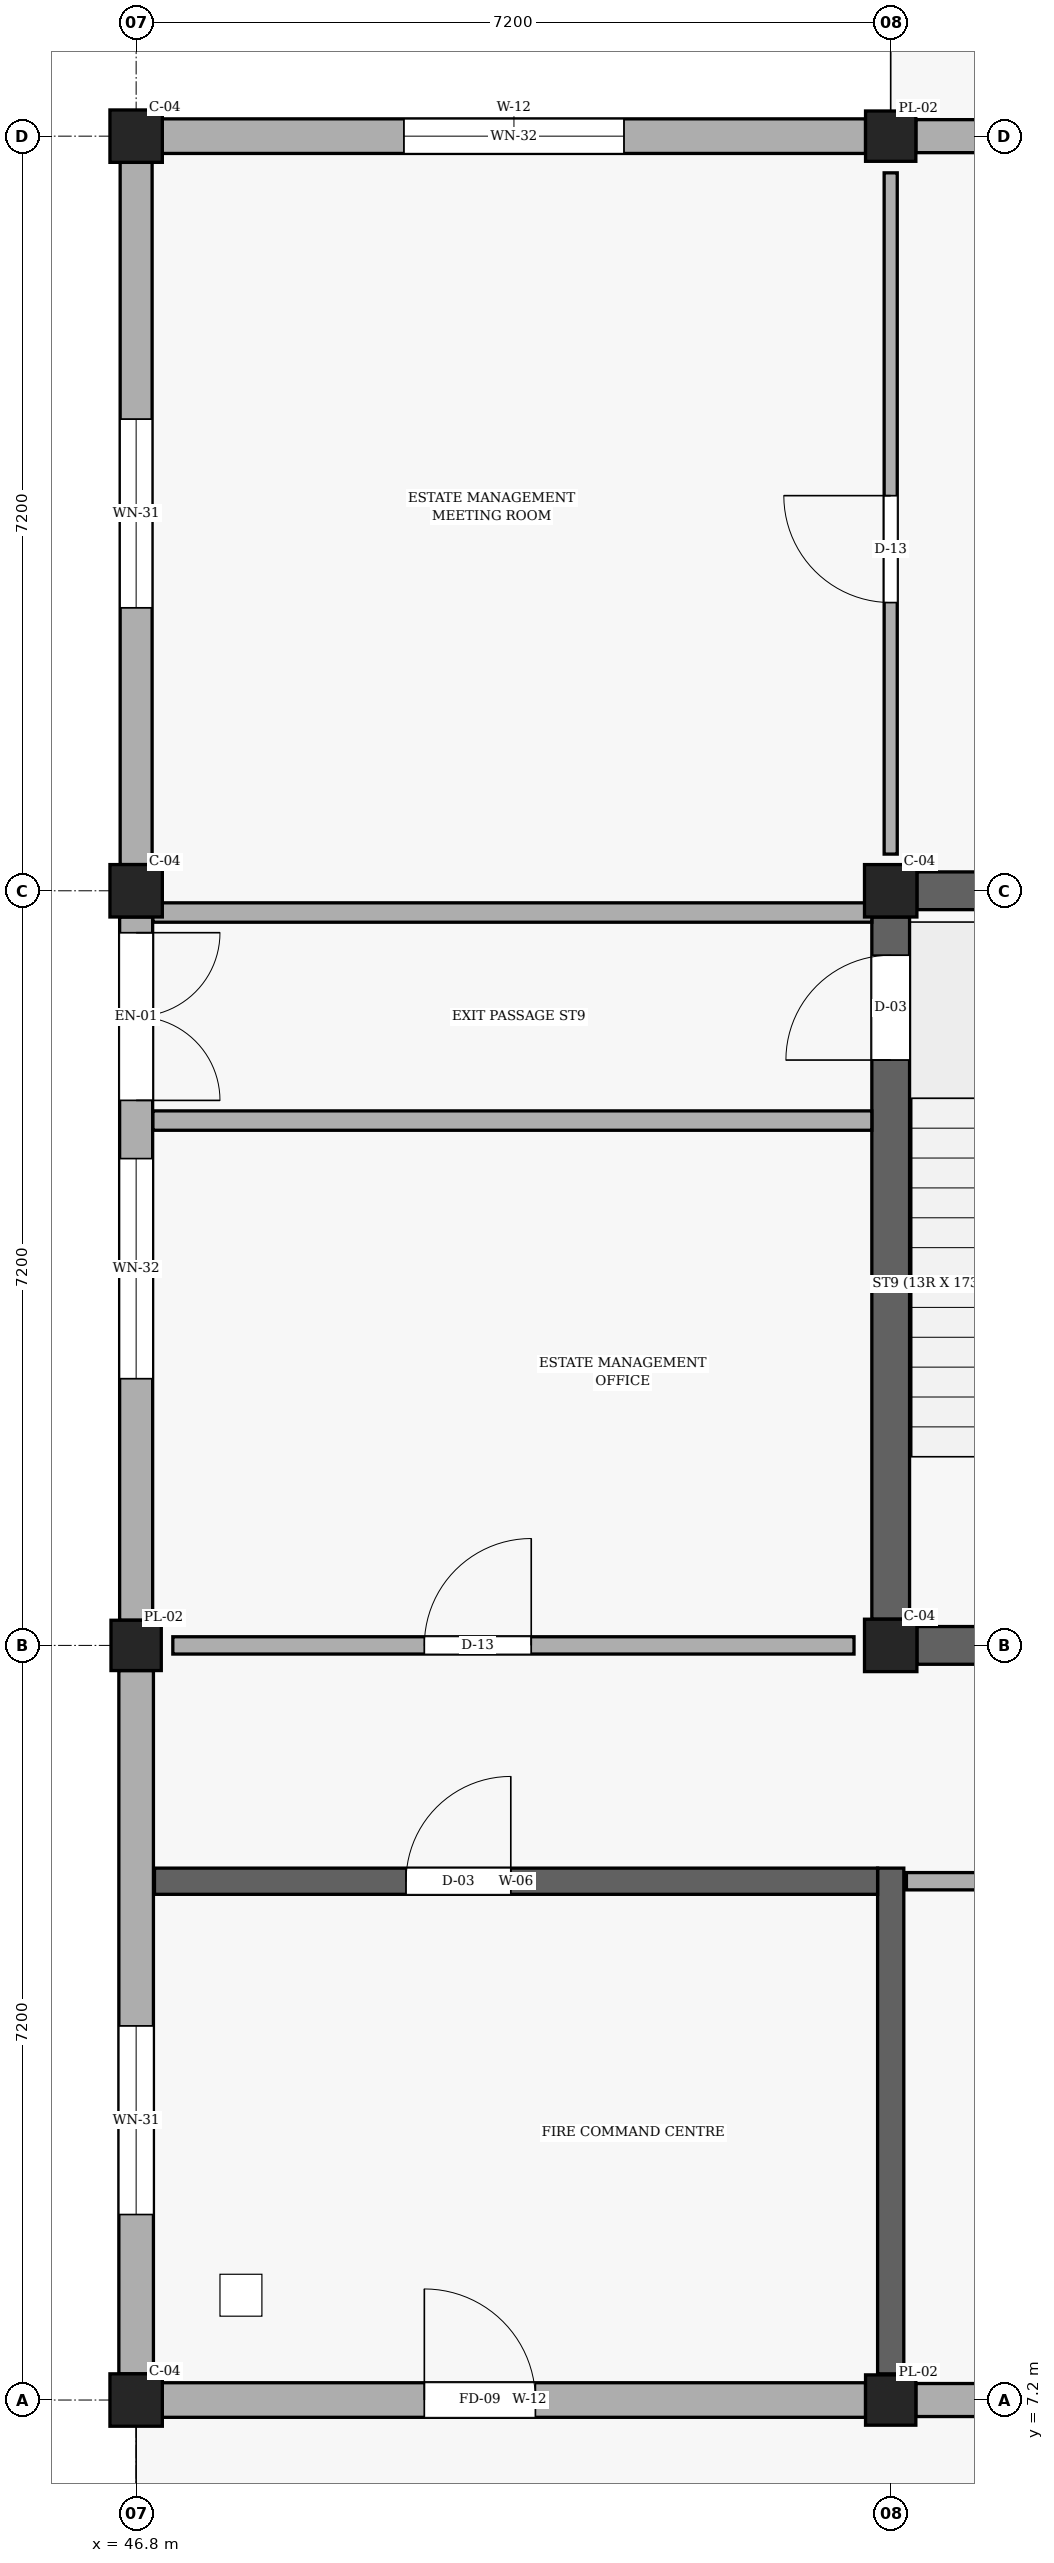
"""IFC4 building model, lengths in metres.
Left out: names, types, materials, properties, quantities, classifications, styles, units other than length and angle.
Written with IfcOpenShell. Run it as: python <this file> out.ifc"""

import sys

from ifc_helpers import new_model, si_unit, direction, frame, frame_2d, origin, origin_2d, place, context, subcontext, project, spatial, rectangle, extrude, element, fill, save


model = new_model("IFC4")
c1 = context("Model", 3, precision=1e-05, world=origin(), true_north=direction((0.0, 1.0)))
c2 = subcontext(c1, "Body", "Model", "MODEL_VIEW")
j1 = project(units=[si_unit("LENGTHUNIT", "METRE"), si_unit("PLANEANGLEUNIT", "RADIAN")], contexts=[c1])
p1 = place(None, origin())
s1 = spatial("IfcSite", under=j1, at=p1, CompositionType="ELEMENT")
p2 = place(p1, origin())
s2 = spatial("IfcBuilding", under=s1, at=p2, CompositionType="ELEMENT")
p3 = place(p2, origin())
s3 = spatial("IfcBuildingStorey", under=s2, at=p3, CompositionType="ELEMENT", Elevation=0.0)
p4 = place(p3, frame((46.8, 7.2, 0.0), z_axis=(0.0, 0.0, 1.0), x_axis=(1.0, 0.0, 0.0)))
e1 = element("IfcColumn", 1, at=p4, inside=s3, PredefinedType="COLUMN", context=c2, shape_type="SweptSolid", body=[
    extrude(rectangle(XDim=0.5, YDim=0.5, at=origin_2d()), origin(), (0.0, 0.0, 1.0), 4.5),
])
p5 = place(p3, frame((46.8, 14.4, 0.0), z_axis=(0.0, 0.0, 1.0), x_axis=(1.0, 0.0, 0.0)))
e2 = element("IfcColumn", 2, at=p5, inside=s3, PredefinedType="PILASTER", context=c2, shape_type="SweptSolid", body=[
    extrude(rectangle(XDim=0.48, YDim=0.48, at=origin_2d()), origin(), (0.0, 0.0, 1.0), 4.5),
])
for number, where, z_axis, x_axis in (
    (3, (46.8, 21.6, 0.0), (0.0, 0.0, 1.0), (1.0, 0.0, 0.0)),
    (4, (46.8, 28.8, 0.0), (0.0, 0.0, 1.0), (1.0, 0.0, 0.0)),
):
    element("IfcColumn", number, at=place(p3, frame(where, z_axis=z_axis, x_axis=x_axis)), inside=s3, PredefinedType="COLUMN", context=c2, shape_type="SweptSolid", body=[
        extrude(rectangle(XDim=0.5, YDim=0.5, at=origin_2d()), origin(), (0.0, 0.0, 1.0), 4.5),
    ])
p6 = place(p3, frame((54.0, 7.2, 0.0), z_axis=(0.0, 0.0, 1.0), x_axis=(1.0, 0.0, 0.0)))
e5 = element("IfcColumn", 5, at=p6, inside=s3, PredefinedType="PILASTER", context=c2, shape_type="SweptSolid", body=[
    extrude(rectangle(XDim=0.48, YDim=0.48, at=origin_2d()), origin(), (0.0, 0.0, 1.0), 4.5),
])
for number, where, z_axis, x_axis in (
    (6, (54.0, 14.4, 0.0), (0.0, 0.0, 1.0), (1.0, 0.0, 0.0)),
    (7, (54.0, 21.6, 0.0), (0.0, 0.0, 1.0), (1.0, 0.0, 0.0)),
):
    element("IfcColumn", number, at=place(p3, frame(where, z_axis=z_axis, x_axis=x_axis)), inside=s3, PredefinedType="COLUMN", context=c2, shape_type="SweptSolid", body=[
        extrude(rectangle(XDim=0.5, YDim=0.5, at=origin_2d()), origin(), (0.0, 0.0, 1.0), 4.5),
    ])
p7 = place(p3, frame((54.0, 28.8, 0.0), z_axis=(0.0, 0.0, 1.0), x_axis=(1.0, 0.0, 0.0)))
e8 = element("IfcColumn", 8, at=p7, inside=s3, PredefinedType="PILASTER", context=c2, shape_type="SweptSolid", body=[
    extrude(rectangle(XDim=0.48, YDim=0.48, at=origin_2d()), origin(), (0.0, 0.0, 1.0), 4.5),
])
p8 = place(p3, frame((47.05, 7.2, 0.0), z_axis=(0.0, 0.0, 1.0), x_axis=(1.0, 0.0, 0.0)))
e9 = element("IfcWall", 9, at=p8, inside=s3, PredefinedType="SOLIDWALL", context=c2, shape_type="SweptSolid", body=[
    extrude(rectangle(XDim=6.71, YDim=0.33, at=frame_2d((3.355, 0.0))), origin(), (0.0, 0.0, 1.0), 3.83),
])
p9 = place(p8, frame((2.5, 0.0, 0.0)))
e10 = element("IfcOpeningElement", 10, at=p9, cuts=e9, PredefinedType="OPENING", context=c2, shape_type="SweptSolid", body=[
    extrude(rectangle(XDim=1.06, YDim=2.15, at=frame_2d((0.53, 1.075))), frame((0.0, 0.175, 0.0), z_axis=(0.0, -1.0, 0.0), x_axis=(1.0, 0.0, 0.0)), (0.0, 0.0, 1.0), 0.35),
])
p10 = place(p3, frame((54.24, 7.2, 0.0), z_axis=(0.0, 0.0, 1.0), x_axis=(1.0, 0.0, 0.0)))
e11 = element("IfcWall", 11, at=p10, inside=s3, PredefinedType="SOLIDWALL", context=c2, shape_type="SweptSolid", body=[
    extrude(rectangle(XDim=6.71, YDim=0.315, at=frame_2d((3.355, 0.0))), origin(), (0.0, 0.0, 1.0), 3.83),
])
p11 = place(p10, frame((2.405, 0.0, 0.0)))
e12 = element("IfcOpeningElement", 12, at=p11, cuts=e11, PredefinedType="OPENING", context=c2, shape_type="SweptSolid", body=[
    extrude(rectangle(XDim=1.9, YDim=2.2, at=frame_2d((0.95, 1.1))), frame((0.0, 0.167, 0.0), z_axis=(0.0, -1.0, 0.0), x_axis=(1.0, 0.0, 0.0)), (0.0, 0.0, 1.0), 0.335),
])
p12 = place(p3, frame((60.95, 28.8, 0.0), z_axis=(0.0, 0.0, 1.0), x_axis=(-1.0, 0.0, 0.0)))
e13 = element("IfcWall", 13, at=p12, inside=s3, PredefinedType="SOLIDWALL", context=c2, shape_type="SweptSolid", body=[
    extrude(rectangle(XDim=6.71, YDim=0.315, at=frame_2d((3.355, 0.0))), origin(), (0.0, 0.0, 1.0), 3.83),
])
p13 = place(p12, frame((2.555, 0.0, 0.0)))
e14 = element("IfcOpeningElement", 14, at=p13, cuts=e13, PredefinedType="OPENING", context=c2, shape_type="SweptSolid", body=[
    extrude(rectangle(XDim=1.6, YDim=2.25, at=frame_2d((0.8, 1.125))), frame((0.0, 0.167, 0.0), z_axis=(0.0, -1.0, 0.0), x_axis=(1.0, 0.0, 0.0)), (0.0, 0.0, 1.0), 0.335),
])
p14 = place(p3, frame((53.76, 28.8, 0.0), z_axis=(0.0, 0.0, 1.0), x_axis=(-1.0, 0.0, 0.0)))
e15 = element("IfcWall", 15, at=p14, inside=s3, PredefinedType="SOLIDWALL", context=c2, shape_type="SweptSolid", body=[
    extrude(rectangle(XDim=6.71, YDim=0.33, at=frame_2d((3.355, 0.0))), origin(), (0.0, 0.0, 1.0), 3.83),
])
p15 = place(p14, frame((2.305, 0.0, 0.85)))
e16 = element("IfcOpeningElement", 16, at=p15, cuts=e15, PredefinedType="OPENING", context=c2, shape_type="SweptSolid", body=[
    extrude(rectangle(XDim=2.1, YDim=2.1, at=frame_2d((1.05, 1.05))), frame((0.0, 0.175, 0.0), z_axis=(0.0, -1.0, 0.0), x_axis=(1.0, 0.0, 0.0)), (0.0, 0.0, 1.0), 0.35),
])
p16 = place(p3, frame((46.8, 28.55, 0.0), z_axis=(0.0, 0.0, 1.0), x_axis=(0.0, -1.0, 0.0)))
e17 = element("IfcWall", 17, at=p16, inside=s3, PredefinedType="SOLIDWALL", context=c2, shape_type="SweptSolid", body=[
    extrude(rectangle(XDim=6.7, YDim=0.305, at=frame_2d((3.35, 0.0))), origin(), (0.0, 0.0, 1.0), 3.83),
])
p17 = place(p16, frame((2.45, 0.0, 0.85)))
e18 = element("IfcOpeningElement", 18, at=p17, cuts=e17, PredefinedType="OPENING", context=c2, shape_type="SweptSolid", body=[
    extrude(rectangle(XDim=1.8, YDim=2.1, at=frame_2d((0.9, 1.05))), frame((0.0, 0.163, 0.0), z_axis=(0.0, -1.0, 0.0), x_axis=(1.0, 0.0, 0.0)), (0.0, 0.0, 1.0), 0.325),
])
p18 = place(p3, frame((46.8, 21.35, 0.0), z_axis=(0.0, 0.0, 1.0), x_axis=(0.0, -1.0, 0.0)))
e19 = element("IfcWall", 19, at=p18, inside=s3, PredefinedType="SOLIDWALL", context=c2, shape_type="SweptSolid", body=[
    extrude(rectangle(XDim=6.71, YDim=0.315, at=frame_2d((3.355, 0.0))), origin(), (0.0, 0.0, 1.0), 3.83),
])
p19 = place(p18, frame((2.305, 0.0, 0.85)))
e20 = element("IfcOpeningElement", 20, at=p19, cuts=e19, PredefinedType="OPENING", context=c2, shape_type="SweptSolid", body=[
    extrude(rectangle(XDim=2.1, YDim=2.1, at=frame_2d((1.05, 1.05))), frame((0.0, 0.167, 0.0), z_axis=(0.0, -1.0, 0.0), x_axis=(1.0, 0.0, 0.0)), (0.0, 0.0, 1.0), 0.335),
])
p20 = place(p18, frame((0.15, 0.0, 0.0)))
e21 = element("IfcOpeningElement", 21, at=p20, cuts=e19, PredefinedType="OPENING", context=c2, shape_type="SweptSolid", body=[
    extrude(rectangle(XDim=1.6, YDim=2.25, at=frame_2d((0.8, 1.125))), frame((0.0, 0.167, 0.0), z_axis=(0.0, -1.0, 0.0), x_axis=(1.0, 0.0, 0.0)), (0.0, 0.0, 1.0), 0.335),
])
p21 = place(p3, frame((46.8, 14.16, 0.0), z_axis=(0.0, 0.0, 1.0), x_axis=(0.0, -1.0, 0.0)))
e22 = element("IfcWall", 22, at=p21, inside=s3, PredefinedType="SOLIDWALL", context=c2, shape_type="SweptSolid", body=[
    extrude(rectangle(XDim=6.71, YDim=0.33, at=frame_2d((3.355, 0.0))), origin(), (0.0, 0.0, 1.0), 3.83),
])
p22 = place(p21, frame((3.39, 0.0, 0.85)))
e23 = element("IfcOpeningElement", 23, at=p22, cuts=e22, PredefinedType="OPENING", context=c2, shape_type="SweptSolid", body=[
    extrude(rectangle(XDim=1.8, YDim=2.1, at=frame_2d((0.9, 1.05))), frame((0.0, 0.175, 0.0), z_axis=(0.0, -1.0, 0.0), x_axis=(1.0, 0.0, 0.0)), (0.0, 0.0, 1.0), 0.35),
])
p23 = place(p3, frame((54.0, 14.65, 0.0), z_axis=(0.0, 0.0, 1.0), x_axis=(0.0, 1.0, 0.0)))
e24 = element("IfcWall", 24, at=p23, inside=s3, PredefinedType="SHEAR", context=c2, shape_type="SweptSolid", body=[
    extrude(rectangle(XDim=6.7, YDim=0.36, at=frame_2d((3.35, 0.0))), origin(), (0.0, 0.0, 1.0), 4.26),
])
p24 = place(p23, frame((5.335, 0.0, 0.0)))
e25 = element("IfcOpeningElement", 25, at=p24, cuts=e24, PredefinedType="OPENING", context=c2, shape_type="SweptSolid", body=[
    extrude(rectangle(XDim=1.0, YDim=2.15, at=frame_2d((0.5, 1.075))), frame((0.0, 0.19, 0.0), z_axis=(0.0, -1.0, 0.0), x_axis=(1.0, 0.0, 0.0)), (0.0, 0.0, 1.0), 0.38),
])
p25 = place(p3, frame((54.25, 21.6, 0.0), z_axis=(0.0, 0.0, 1.0), x_axis=(1.0, 0.0, 0.0)))
e26 = element("IfcWall", 26, at=p25, inside=s3, PredefinedType="SHEAR", context=c2, shape_type="SweptSolid", body=[
    extrude(rectangle(XDim=6.7, YDim=0.36, at=frame_2d((3.35, 0.0))), origin(), (0.0, 0.0, 1.0), 4.26),
])
p26 = place(p3, frame((54.25, 14.4, 0.0), z_axis=(0.0, 0.0, 1.0), x_axis=(1.0, 0.0, 0.0)))
e27 = element("IfcWall", 27, at=p26, inside=s3, PredefinedType="SHEAR", context=c2, shape_type="SweptSolid", body=[
    extrude(rectangle(XDim=6.7, YDim=0.36, at=frame_2d((3.35, 0.0))), origin(), (0.0, 0.0, 1.0), 4.26),
])
p27 = place(p26, frame((4.5, 0.0, 0.0)))
e28 = element("IfcOpeningElement", 28, at=p27, cuts=e27, PredefinedType="OPENING", context=c2, shape_type="SweptSolid", body=[
    extrude(rectangle(XDim=1.1, YDim=2.15, at=frame_2d((0.55, 1.075))), frame((0.0, 0.19, 0.0), z_axis=(0.0, -1.0, 0.0), x_axis=(1.0, 0.0, 0.0)), (0.0, 0.0, 1.0), 0.38),
])
p28 = place(p3, frame((54.0, 7.45, 0.0), z_axis=(0.0, 0.0, 1.0), x_axis=(0.0, 1.0, 0.0)))
e29 = element("IfcWall", 29, at=p28, inside=s3, PredefinedType="SHEAR", context=c2, shape_type="SweptSolid", body=[
    extrude(rectangle(XDim=4.825, YDim=0.25, at=frame_2d((2.413, 0.0))), origin(), (0.0, 0.0, 1.0), 3.41),
])
p29 = place(p3, frame((46.975, 12.15, 0.0), z_axis=(0.0, 0.0, 1.0), x_axis=(1.0, 0.0, 0.0)))
e30 = element("IfcWall", 30, at=p29, inside=s3, PredefinedType="SHEAR", context=c2, shape_type="SweptSolid", body=[
    extrude(rectangle(XDim=6.9, YDim=0.25, at=frame_2d((3.45, 0.0))), origin(), (0.0, 0.0, 1.0), 3.41),
])
p30 = place(p29, frame((2.4, 0.0, 0.0)))
e31 = element("IfcOpeningElement", 31, at=p30, cuts=e30, PredefinedType="OPENING", context=c2, shape_type="SweptSolid", body=[
    extrude(rectangle(XDim=1.0, YDim=2.15, at=frame_2d((0.5, 1.075))), frame((0.0, 0.135, 0.0), z_axis=(0.0, -1.0, 0.0), x_axis=(1.0, 0.0, 0.0)), (0.0, 0.0, 1.0), 0.27),
])
p31 = place(p3, frame((54.15, 12.15, 0.0), z_axis=(0.0, 0.0, 1.0), x_axis=(1.0, 0.0, 0.0)))
e32 = element("IfcWall", 32, at=p31, inside=s3, PredefinedType="PARTITIONING", context=c2, shape_type="SweptSolid", body=[
    extrude(rectangle(XDim=6.97, YDim=0.165, at=frame_2d((3.485, 0.0))), origin(), (0.0, 0.0, 1.0), 3.41),
])
p32 = place(p31, frame((2.4, 0.0, 0.0)))
e33 = element("IfcOpeningElement", 33, at=p32, cuts=e32, PredefinedType="OPENING", context=c2, shape_type="SweptSolid", body=[
    extrude(rectangle(XDim=1.12, YDim=2.18, at=frame_2d((0.56, 1.09))), frame((0.0, 0.093, 0.0), z_axis=(0.0, -1.0, 0.0), x_axis=(1.0, 0.0, 0.0)), (0.0, 0.0, 1.0), 0.185),
])
p33 = place(p3, frame((47.15, 14.4, 0.0), z_axis=(0.0, 0.0, 1.0), x_axis=(1.0, 0.0, 0.0)))
e34 = element("IfcWall", 34, at=p33, inside=s3, PredefinedType="PARTITIONING", context=c2, shape_type="SweptSolid", body=[
    extrude(rectangle(XDim=6.5, YDim=0.165, at=frame_2d((3.25, 0.0))), origin(), (0.0, 0.0, 1.0), 3.41),
])
p34 = place(p33, frame((2.4, 0.0, 0.0)))
e35 = element("IfcOpeningElement", 35, at=p34, cuts=e34, PredefinedType="OPENING", context=c2, shape_type="SweptSolid", body=[
    extrude(rectangle(XDim=1.02, YDim=2.15, at=frame_2d((0.51, 1.075))), frame((0.0, 0.093, 0.0), z_axis=(0.0, -1.0, 0.0), x_axis=(1.0, 0.0, 0.0)), (0.0, 0.0, 1.0), 0.185),
])
p35 = place(p3, frame((54.0, 21.95, 0.0), z_axis=(0.0, 0.0, 1.0), x_axis=(0.0, 1.0, 0.0)))
e36 = element("IfcWall", 36, at=p35, inside=s3, PredefinedType="PARTITIONING", context=c2, shape_type="SweptSolid", body=[
    extrude(rectangle(XDim=6.5, YDim=0.125, at=frame_2d((3.25, 0.0))), origin(), (0.0, 0.0, 1.0), 3.41),
])
p36 = place(p35, frame((2.4, 0.0, 0.0)))
e37 = element("IfcOpeningElement", 37, at=p36, cuts=e36, PredefinedType="OPENING", context=c2, shape_type="SweptSolid", body=[
    extrude(rectangle(XDim=1.02, YDim=2.15, at=frame_2d((0.51, 1.075))), frame((0.0, 0.073, 0.0), z_axis=(0.0, -1.0, 0.0), x_axis=(1.0, 0.0, 0.0)), (0.0, 0.0, 1.0), 0.145),
])
for number, where, z_axis, x_axis in (
    (38, (46.96, 19.407, 0.0), (0.0, 0.0, 1.0), (1.0, 0.0, 0.0)),
    (39, (46.96, 21.393, 0.0), (0.0, 0.0, 1.0), (1.0, 0.0, 0.0)),
):
    element("IfcWall", number, at=place(p3, frame(where, z_axis=z_axis, x_axis=x_axis)), inside=s3, PredefinedType="PARTITIONING", context=c2, shape_type="SweptSolid", body=[
        extrude(rectangle(XDim=6.86, YDim=0.185, at=frame_2d((3.43, 0.0))), origin(), (0.0, 0.0, 1.0), 3.41),
    ])
p37 = place(p9, frame((1.06, 0.0, 0.0), z_axis=(0.0, 0.0, 1.0), x_axis=(-1.0, 0.0, 0.0)))
e40 = element("IfcDoor", 40, at=p37, inside=s3, OperationType="SINGLE_SWING_LEFT", PredefinedType="DOOR", context=c2, shape_type="SweptSolid", body=[
    extrude(rectangle(XDim=1.06, YDim=2.15, at=frame_2d((0.53, 1.075))), frame((0.0, 0.025, 0.0), z_axis=(0.0, -1.0, 0.0), x_axis=(1.0, 0.0, 0.0)), (0.0, 0.0, 1.0), 0.05),
])
fill(e10, e40)
p38 = place(p15, origin())
e41 = element("IfcWindow", 41, at=p38, inside=s3, PartitioningType="SINGLE_PANEL", PredefinedType="WINDOW", context=c2, shape_type="SweptSolid", body=[
    extrude(rectangle(XDim=2.1, YDim=2.1, at=frame_2d((1.05, 1.05))), frame((0.0, 0.03, 0.0), z_axis=(0.0, -1.0, 0.0), x_axis=(1.0, 0.0, 0.0)), (0.0, 0.0, 1.0), 0.06),
])
fill(e16, e41)
p39 = place(p17, origin())
e42 = element("IfcWindow", 42, at=p39, inside=s3, PartitioningType="SINGLE_PANEL", PredefinedType="WINDOW", context=c2, shape_type="SweptSolid", body=[
    extrude(rectangle(XDim=1.8, YDim=2.1, at=frame_2d((0.9, 1.05))), frame((0.0, 0.03, 0.0), z_axis=(0.0, -1.0, 0.0), x_axis=(1.0, 0.0, 0.0)), (0.0, 0.0, 1.0), 0.06),
])
fill(e18, e42)
p40 = place(p19, origin())
e43 = element("IfcWindow", 43, at=p40, inside=s3, PartitioningType="SINGLE_PANEL", PredefinedType="WINDOW", context=c2, shape_type="SweptSolid", body=[
    extrude(rectangle(XDim=2.1, YDim=2.1, at=frame_2d((1.05, 1.05))), frame((0.0, 0.03, 0.0), z_axis=(0.0, -1.0, 0.0), x_axis=(1.0, 0.0, 0.0)), (0.0, 0.0, 1.0), 0.06),
])
fill(e20, e43)
p41 = place(p22, origin())
e44 = element("IfcWindow", 44, at=p41, inside=s3, PartitioningType="SINGLE_PANEL", PredefinedType="WINDOW", context=c2, shape_type="SweptSolid", body=[
    extrude(rectangle(XDim=1.8, YDim=2.1, at=frame_2d((0.9, 1.05))), frame((0.0, 0.03, 0.0), z_axis=(0.0, -1.0, 0.0), x_axis=(1.0, 0.0, 0.0)), (0.0, 0.0, 1.0), 0.06),
])
fill(e23, e44)
p42 = place(p30, origin())
e45 = element("IfcDoor", 45, at=p42, inside=s3, OperationType="SINGLE_SWING_RIGHT", PredefinedType="DOOR", context=c2, shape_type="SweptSolid", body=[
    extrude(rectangle(XDim=1.0, YDim=2.15, at=frame_2d((0.5, 1.075))), frame((0.0, 0.025, 0.0), z_axis=(0.0, -1.0, 0.0), x_axis=(1.0, 0.0, 0.0)), (0.0, 0.0, 1.0), 0.05),
])
fill(e31, e45)
p43 = place(p34, origin())
e46 = element("IfcDoor", 46, at=p43, inside=s3, OperationType="SINGLE_SWING_RIGHT", PredefinedType="DOOR", context=c2, shape_type="SweptSolid", body=[
    extrude(rectangle(XDim=1.02, YDim=2.15, at=frame_2d((0.51, 1.075))), frame((0.0, 0.025, 0.0), z_axis=(0.0, -1.0, 0.0), x_axis=(1.0, 0.0, 0.0)), (0.0, 0.0, 1.0), 0.05),
])
fill(e35, e46)
p44 = place(p36, origin())
e47 = element("IfcDoor", 47, at=p44, inside=s3, OperationType="SINGLE_SWING_RIGHT", PredefinedType="DOOR", context=c2, shape_type="SweptSolid", body=[
    extrude(rectangle(XDim=1.02, YDim=2.15, at=frame_2d((0.51, 1.075))), frame((0.0, 0.025, 0.0), z_axis=(0.0, -1.0, 0.0), x_axis=(1.0, 0.0, 0.0)), (0.0, 0.0, 1.0), 0.05),
])
fill(e37, e47)
p45 = place(p24, origin())
e48 = element("IfcDoor", 48, at=p45, inside=s3, OperationType="SINGLE_SWING_LEFT", PredefinedType="DOOR", context=c2, shape_type="SweptSolid", body=[
    extrude(rectangle(XDim=1.0, YDim=2.15, at=frame_2d((0.5, 1.075))), frame((0.0, 0.025, 0.0), z_axis=(0.0, -1.0, 0.0), x_axis=(1.0, 0.0, 0.0)), (0.0, 0.0, 1.0), 0.05),
])
fill(e25, e48)
p46 = place(p20, frame((1.6, 0.0, 0.0), z_axis=(0.0, 0.0, 1.0), x_axis=(-1.0, 0.0, 0.0)))
e49 = element("IfcDoor", 49, at=p46, inside=s3, OperationType="DOUBLE_DOOR_SINGLE_SWING", PredefinedType="DOOR", context=c2, shape_type="SweptSolid", body=[
    extrude(rectangle(XDim=1.6, YDim=2.25, at=frame_2d((0.8, 1.125))), frame((0.0, 0.025, 0.0), z_axis=(0.0, -1.0, 0.0), x_axis=(1.0, 0.0, 0.0)), (0.0, 0.0, 1.0), 0.05),
])
fill(e21, e49)
save(model, sys.argv[1])
